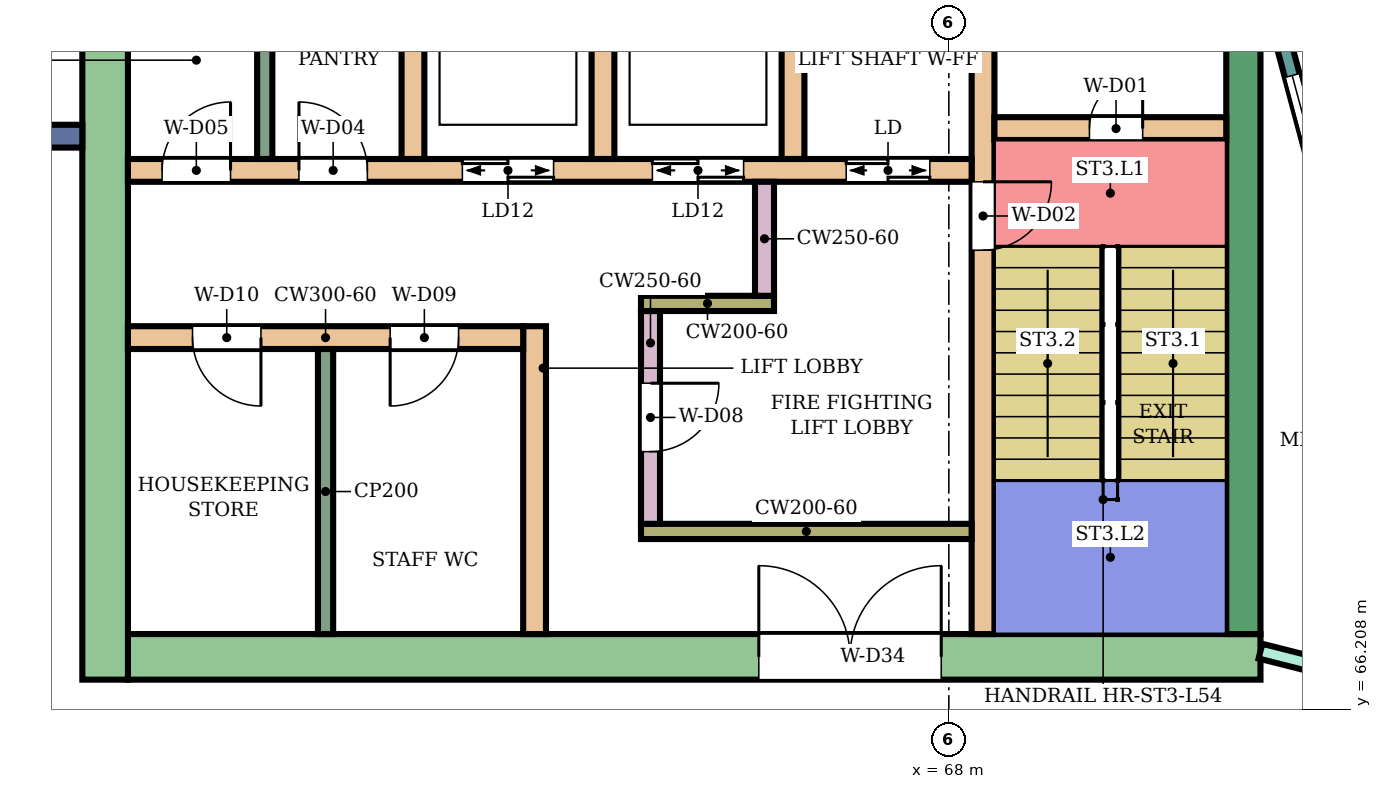
"""IFC4 building model, lengths in metres.
Left out: names, types, materials, properties, quantities, classifications, styles, units other than length and angle.
Written with IfcOpenShell. Run it as: python <this file> out.ifc"""

import sys

from ifc_helpers import new_model, si_unit, direction, frame, frame_2d, origin, place, context, subcontext, project, spatial, rectangle, extrude, element, fill, save


model = new_model("IFC4")
c1 = context("Model", 3, precision=1e-05, world=origin(), true_north=direction((0.0, 1.0)))
c2 = subcontext(c1, "Body", "Model", "MODEL_VIEW")
j1 = project(units=[si_unit("LENGTHUNIT", "METRE"), si_unit("PLANEANGLEUNIT", "RADIAN")], contexts=[c1])
p1 = place(None, origin())
s1 = spatial("IfcSite", under=j1, at=p1, CompositionType="ELEMENT")
p2 = place(p1, origin())
s2 = spatial("IfcBuilding", under=s1, at=p2, CompositionType="ELEMENT")
p3 = place(p2, frame((0.0, 0.0, 237.3)))
s3 = spatial("IfcBuildingStorey", under=s2, at=p3, CompositionType="ELEMENT", Elevation=237.3)
p4 = place(p3, frame((72.1, 66.9, 0.0), z_axis=(0.0, 0.0, 1.0), x_axis=(-1.0, 0.0, 0.0)))
e1 = element("IfcWall", 1, at=p4, inside=s3, PredefinedType="SHEAR", context=c2, shape_type="SweptSolid", body=[
    extrude(rectangle(XDim=14.9, YDim=0.6, at=frame_2d((7.45, 0.0))), origin(), (0.0, 0.0, 1.0), 3.88),
])
p5 = place(p4, frame((4.2, 0.0, 0.0)))
e2 = element("IfcOpeningElement", 2, at=p5, cuts=e1, PredefinedType="OPENING", context=c2, shape_type="SweptSolid", body=[
    extrude(rectangle(XDim=2.4, YDim=2.4, at=frame_2d((1.2, 1.2))), frame((0.0, 0.31, 0.0), z_axis=(0.0, -1.0, 0.0), x_axis=(1.0, 0.0, 0.0)), (0.0, 0.0, 1.0), 0.62),
])
p6 = place(p3, frame((71.875, 75.0, 0.0), z_axis=(0.0, 0.0, 1.0), x_axis=(0.0, -1.0, 0.0)))
e3 = element("IfcWall", 3, at=p6, inside=s3, PredefinedType="SHEAR", context=c2, shape_type="SweptSolid", body=[
    extrude(rectangle(XDim=7.8, YDim=0.45, at=frame_2d((3.9, 0.0))), origin(), (0.0, 0.0, 1.0), 3.88),
])
p7 = place(p3, frame((56.9, 83.4, 0.0), z_axis=(0.0, 0.0, 1.0), x_axis=(0.0, -1.0, 0.0)))
e4 = element("IfcWall", 4, at=p7, inside=s3, PredefinedType="SHEAR", context=c2, shape_type="SweptSolid", body=[
    extrude(rectangle(XDim=16.8, YDim=0.6, at=frame_2d((8.4, 0.0))), origin(), (0.0, 0.0, 1.0), 3.88),
])
p8 = place(p3, frame((68.45, 75.0, 0.0), z_axis=(0.0, 0.0, 1.0), x_axis=(0.0, -1.0, 0.0)))
e5 = element("IfcWall", 5, at=p8, inside=s3, PredefinedType="SHEAR", context=c2, shape_type="SweptSolid", body=[
    extrude(rectangle(XDim=7.8, YDim=0.3, at=frame_2d((3.9, 0.0))), origin(), (0.0, 0.0, 1.0), 3.88),
])
p9 = place(p8, frame((1.85, 0.0, 0.0)))
e6 = element("IfcOpeningElement", 6, at=p9, cuts=e5, PredefinedType="OPENING", context=c2, shape_type="SweptSolid", body=[
    extrude(rectangle(XDim=0.9, YDim=2.1, at=frame_2d((0.45, 1.05))), frame((0.0, 0.16, 0.0), z_axis=(0.0, -1.0, 0.0), x_axis=(1.0, 0.0, 0.0)), (0.0, 0.0, 1.0), 0.32),
])
p10 = place(p3, frame((71.65, 73.85, 0.0), z_axis=(0.0, 0.0, 1.0), x_axis=(-1.0, 0.0, 0.0)))
e7 = element("IfcWall", 7, at=p10, inside=s3, PredefinedType="SHEAR", context=c2, shape_type="SweptSolid", body=[
    extrude(rectangle(XDim=3.05, YDim=0.3, at=frame_2d((1.525, 0.0))), origin(), (0.0, 0.0, 1.0), 3.88),
])
p11 = place(p10, frame((1.1, 0.0, 0.0)))
e8 = element("IfcOpeningElement", 8, at=p11, cuts=e7, PredefinedType="OPENING", context=c2, shape_type="SweptSolid", body=[
    extrude(rectangle(XDim=0.7, YDim=2.0, at=frame_2d((0.35, 1.0))), frame((0.0, 0.16, 0.0), z_axis=(0.0, -1.0, 0.0), x_axis=(1.0, 0.0, 0.0)), (0.0, 0.0, 1.0), 0.32),
])
p12 = place(p3, frame((68.3, 73.3, 0.0), z_axis=(0.0, 0.0, 1.0), x_axis=(-1.0, 0.0, 0.0)))
e9 = element("IfcWall", 9, at=p12, inside=s3, PredefinedType="SHEAR", context=c2, shape_type="SweptSolid", body=[
    extrude(rectangle(XDim=11.1, YDim=0.3, at=frame_2d((5.55, 0.0))), origin(), (0.0, 0.0, 1.0), 3.88),
])
p13 = place(p12, frame((0.55, 0.0, 0.0)))
e10 = element("IfcOpeningElement", 10, at=p13, cuts=e9, PredefinedType="OPENING", context=c2, shape_type="SweptSolid", body=[
    extrude(rectangle(XDim=1.1, YDim=2.1, at=frame_2d((0.55, 1.05))), frame((0.0, 0.16, 0.0), z_axis=(0.0, -1.0, 0.0), x_axis=(1.0, 0.0, 0.0)), (0.0, 0.0, 1.0), 0.32),
])
p14 = place(p12, frame((3.0, 0.0, 0.0)))
e11 = element("IfcOpeningElement", 11, at=p14, cuts=e9, PredefinedType="OPENING", context=c2, shape_type="SweptSolid", body=[
    extrude(rectangle(XDim=1.2, YDim=2.1, at=frame_2d((0.6, 1.05))), frame((0.0, 0.16, 0.0), z_axis=(0.0, -1.0, 0.0), x_axis=(1.0, 0.0, 0.0)), (0.0, 0.0, 1.0), 0.32),
])
p15 = place(p12, frame((5.5, 0.0, 0.0)))
e12 = element("IfcOpeningElement", 12, at=p15, cuts=e9, PredefinedType="OPENING", context=c2, shape_type="SweptSolid", body=[
    extrude(rectangle(XDim=1.2, YDim=2.1, at=frame_2d((0.6, 1.05))), frame((0.0, 0.16, 0.0), z_axis=(0.0, -1.0, 0.0), x_axis=(1.0, 0.0, 0.0)), (0.0, 0.0, 1.0), 0.32),
])
p16 = place(p12, frame((7.95, 0.0, 0.0)))
e13 = element("IfcOpeningElement", 13, at=p16, cuts=e9, PredefinedType="OPENING", context=c2, shape_type="SweptSolid", body=[
    extrude(rectangle(XDim=0.9, YDim=2.1, at=frame_2d((0.45, 1.05))), frame((0.0, 0.16, 0.0), z_axis=(0.0, -1.0, 0.0), x_axis=(1.0, 0.0, 0.0)), (0.0, 0.0, 1.0), 0.32),
])
p17 = place(p12, frame((9.75, 0.0, 0.0)))
e14 = element("IfcOpeningElement", 14, at=p17, cuts=e9, PredefinedType="OPENING", context=c2, shape_type="SweptSolid", body=[
    extrude(rectangle(XDim=0.9, YDim=2.1, at=frame_2d((0.45, 1.05))), frame((0.0, 0.16, 0.0), z_axis=(0.0, -1.0, 0.0), x_axis=(1.0, 0.0, 0.0)), (0.0, 0.0, 1.0), 0.32),
])
for number, where, z_axis, x_axis in (
    (15, (65.95, 76.0, 0.0), (0.0, 0.0, 1.0), (0.0, -1.0, 0.0)),
    (16, (63.45, 76.0, 0.0), (0.0, 0.0, 1.0), (0.0, -1.0, 0.0)),
    (17, (60.95, 76.0, 0.0), (0.0, 0.0, 1.0), (0.0, -1.0, 0.0)),
):
    element("IfcWall", number, at=place(p3, frame(where, z_axis=z_axis, x_axis=x_axis)), inside=s3, PredefinedType="SHEAR", context=c2, shape_type="SweptSolid", body=[
        extrude(rectangle(XDim=2.55, YDim=0.3, at=frame_2d((1.275, 0.0))), origin(), (0.0, 0.0, 1.0), 3.88),
    ])
p18 = place(p3, frame((68.3, 68.55, 0.0), z_axis=(0.0, 0.0, 1.0), x_axis=(-1.0, 0.0, 0.0)))
e18 = element("IfcWall", 18, at=p18, inside=s3, PredefinedType="SHEAR", context=c2, shape_type="SweptSolid", body=[
    extrude(rectangle(XDim=4.35, YDim=0.2, at=frame_2d((2.175, 0.0))), origin(), (0.0, 0.0, 1.0), 3.88),
])
p19 = place(p3, frame((64.075, 71.45, 0.0), z_axis=(0.0, 0.0, 1.0), x_axis=(0.0, -1.0, 0.0)))
e19 = element("IfcWall", 19, at=p19, inside=s3, PredefinedType="SHEAR", context=c2, shape_type="SweptSolid", body=[
    extrude(rectangle(XDim=2.8, YDim=0.25, at=frame_2d((1.4, 0.0))), origin(), (0.0, 0.0, 1.0), 3.88),
])
p20 = place(p19, frame((0.95, 0.0, 0.0)))
e20 = element("IfcOpeningElement", 20, at=p20, cuts=e19, PredefinedType="OPENING", context=c2, shape_type="SweptSolid", body=[
    extrude(rectangle(XDim=0.9, YDim=2.1, at=frame_2d((0.45, 1.05))), frame((0.0, 0.135, 0.0), z_axis=(0.0, -1.0, 0.0), x_axis=(1.0, 0.0, 0.0)), (0.0, 0.0, 1.0), 0.27),
])
p21 = place(p3, frame((65.7, 71.55, 0.0), z_axis=(0.0, 0.0, 1.0), x_axis=(-1.0, 0.0, 0.0)))
e21 = element("IfcWall", 21, at=p21, inside=s3, PredefinedType="SHEAR", context=c2, shape_type="SweptSolid", body=[
    extrude(rectangle(XDim=1.75, YDim=0.2, at=frame_2d((0.875, 0.0))), origin(), (0.0, 0.0, 1.0), 3.88),
])
p22 = place(p3, frame((65.575, 73.15, 0.0), z_axis=(0.0, 0.0, 1.0), x_axis=(0.0, -1.0, 0.0)))
e22 = element("IfcWall", 22, at=p22, inside=s3, PredefinedType="SHEAR", context=c2, shape_type="SweptSolid", body=[
    extrude(rectangle(XDim=1.5, YDim=0.25, at=frame_2d((0.75, 0.0))), origin(), (0.0, 0.0, 1.0), 3.88),
])
p23 = place(p3, frame((62.55, 71.25, 0.0), z_axis=(0.0, 0.0, 1.0), x_axis=(0.0, -1.0, 0.0)))
e23 = element("IfcWall", 23, at=p23, inside=s3, PredefinedType="SHEAR", context=c2, shape_type="SweptSolid", body=[
    extrude(rectangle(XDim=4.05, YDim=0.3, at=frame_2d((2.025, 0.0))), origin(), (0.0, 0.0, 1.0), 3.88),
])
p24 = place(p3, frame((62.4, 71.1, 0.0), z_axis=(0.0, 0.0, 1.0), x_axis=(-1.0, 0.0, 0.0)))
e24 = element("IfcWall", 24, at=p24, inside=s3, PredefinedType="SHEAR", context=c2, shape_type="SweptSolid", body=[
    extrude(rectangle(XDim=5.2, YDim=0.3, at=frame_2d((2.6, 0.0))), origin(), (0.0, 0.0, 1.0), 3.88),
])
p25 = place(p24, frame((0.85, 0.0, 0.0)))
e25 = element("IfcOpeningElement", 25, at=p25, cuts=e24, PredefinedType="OPENING", context=c2, shape_type="SweptSolid", body=[
    extrude(rectangle(XDim=0.9, YDim=2.1, at=frame_2d((0.45, 1.05))), frame((0.0, 0.16, 0.0), z_axis=(0.0, -1.0, 0.0), x_axis=(1.0, 0.0, 0.0)), (0.0, 0.0, 1.0), 0.32),
])
p26 = place(p24, frame((3.45, 0.0, 0.0)))
e26 = element("IfcOpeningElement", 26, at=p26, cuts=e24, PredefinedType="OPENING", context=c2, shape_type="SweptSolid", body=[
    extrude(rectangle(XDim=0.9, YDim=2.1, at=frame_2d((0.45, 1.05))), frame((0.0, 0.16, 0.0), z_axis=(0.0, -1.0, 0.0), x_axis=(1.0, 0.0, 0.0)), (0.0, 0.0, 1.0), 0.32),
])
p27 = place(p3, frame((56.6, 73.75, 0.0), z_axis=(0.0, 0.0, 1.0), x_axis=(-1.0, 0.0, 0.0)))
e27 = element("IfcWall", 27, at=p27, inside=s3, PredefinedType="NOTDEFINED", context=c2, shape_type="SweptSolid", body=[
    extrude(rectangle(XDim=2.416, YDim=0.3, at=frame_2d((1.208, 0.0))), origin(), (0.0, 0.0, 1.0), 4.2),
])
p28 = place(p3, frame((72.396, 75.0, 0.0), z_axis=(0.0, 0.0, 1.0), x_axis=(0.258789828301, -0.965933654434, 0.0)))
e28 = element("IfcWall", 28, at=p28, inside=s3, PredefinedType="NOTDEFINED", context=c2, shape_type="SweptSolid", body=[
    extrude(rectangle(XDim=3.936, YDim=0.2, at=frame_2d((1.968, 0.0))), origin(), (0.0, 0.0, 1.0), 4.2),
])
p29 = place(p28, frame((0.468, 0.0, 0.9)))
e29 = element("IfcOpeningElement", 29, at=p29, cuts=e28, PredefinedType="OPENING", context=c2, shape_type="SweptSolid", body=[
    extrude(rectangle(XDim=3.0, YDim=2.3, at=frame_2d((1.5, 1.15))), frame((0.0, 0.11, 0.0), z_axis=(0.0, -1.0, 0.0), x_axis=(1.0, 0.0, 0.0)), (0.0, 0.0, 1.0), 0.22),
])
p30 = place(p3, frame((72.1, 66.975, 0.0), z_axis=(0.0, 0.0, 1.0), x_axis=(0.969471314457, -0.245204752086, 0.0)))
e30 = element("IfcWall", 30, at=p30, inside=s3, PredefinedType="PARTITIONING", context=c2, shape_type="SweptSolid", body=[
    extrude(rectangle(XDim=2.582, YDim=0.2, at=frame_2d((1.291, 0.0))), origin(), (0.0, 0.0, 1.0), 3.75),
])
p31 = place(p30, frame((0.841, 0.0, 0.0)))
e31 = element("IfcOpeningElement", 31, at=p31, cuts=e30, PredefinedType="OPENING", context=c2, shape_type="SweptSolid", body=[
    extrude(rectangle(XDim=0.9, YDim=2.1, at=frame_2d((0.45, 1.05))), frame((0.0, 0.11, 0.0), z_axis=(0.0, -1.0, 0.0), x_axis=(1.0, 0.0, 0.0)), (0.0, 0.0, 1.0), 0.22),
])
p32 = place(p3, frame((59.0, 76.0, 0.0), z_axis=(0.0, 0.0, 1.0), x_axis=(0.0, -1.0, 0.0)))
e32 = element("IfcWall", 32, at=p32, inside=s3, PredefinedType="PARTITIONING", context=c2, shape_type="SweptSolid", body=[
    extrude(rectangle(XDim=2.55, YDim=0.2, at=frame_2d((1.275, 0.0))), origin(), (0.0, 0.0, 1.0), 3.88),
])
p33 = place(p3, frame((59.8, 70.95, 0.0), z_axis=(0.0, 0.0, 1.0), x_axis=(0.0, -1.0, 0.0)))
e33 = element("IfcWall", 33, at=p33, inside=s3, PredefinedType="PARTITIONING", context=c2, shape_type="SweptSolid", body=[
    extrude(rectangle(XDim=3.75, YDim=0.2, at=frame_2d((1.875, 0.0))), origin(), (0.0, 0.0, 1.0), 3.88),
])
p34 = place(p29, origin())
e34 = element("IfcWindow", 34, at=p34, inside=s3, PartitioningType="SINGLE_PANEL", PredefinedType="WINDOW", context=c2, shape_type="SweptSolid", body=[
    extrude(rectangle(XDim=3.0, YDim=2.3, at=frame_2d((1.5, 1.15))), frame((0.0, 0.03, 0.0), z_axis=(0.0, -1.0, 0.0), x_axis=(1.0, 0.0, 0.0)), (0.0, 0.0, 1.0), 0.06),
])
fill(e29, e34)
p35 = place(p11, frame((0.7, 0.0, 0.0), z_axis=(0.0, 0.0, 1.0), x_axis=(-1.0, 0.0, 0.0)))
e35 = element("IfcDoor", 35, at=p35, inside=s3, OperationType="SINGLE_SWING_RIGHT", PredefinedType="DOOR", context=c2, shape_type="SweptSolid", body=[
    extrude(rectangle(XDim=0.7, YDim=2.0, at=frame_2d((0.35, 1.0))), frame((0.0, 0.025, 0.0), z_axis=(0.0, -1.0, 0.0), x_axis=(1.0, 0.0, 0.0)), (0.0, 0.0, 1.0), 0.05),
])
fill(e8, e35)
p36 = place(p9, origin())
e36 = element("IfcDoor", 36, at=p36, inside=s3, OperationType="SINGLE_SWING_LEFT", PredefinedType="DOOR", context=c2, shape_type="SweptSolid", body=[
    extrude(rectangle(XDim=0.9, YDim=2.1, at=frame_2d((0.45, 1.05))), frame((0.0, 0.025, 0.0), z_axis=(0.0, -1.0, 0.0), x_axis=(1.0, 0.0, 0.0)), (0.0, 0.0, 1.0), 0.05),
])
fill(e6, e36)
p37 = place(p13, origin())
e37 = element("IfcDoor", 37, at=p37, inside=s3, OperationType="DOUBLE_DOOR_SLIDING", PredefinedType="DOOR", context=c2, shape_type="SweptSolid", body=[
    extrude(rectangle(XDim=1.1, YDim=2.1, at=frame_2d((0.55, 1.05))), frame((0.0, 0.025, 0.0), z_axis=(0.0, -1.0, 0.0), x_axis=(1.0, 0.0, 0.0)), (0.0, 0.0, 1.0), 0.05),
])
fill(e10, e37)
p38 = place(p14, origin())
e38 = element("IfcDoor", 38, at=p38, inside=s3, OperationType="DOUBLE_DOOR_SLIDING", PredefinedType="DOOR", context=c2, shape_type="SweptSolid", body=[
    extrude(rectangle(XDim=1.2, YDim=2.1, at=frame_2d((0.6, 1.05))), frame((0.0, 0.025, 0.0), z_axis=(0.0, -1.0, 0.0), x_axis=(1.0, 0.0, 0.0)), (0.0, 0.0, 1.0), 0.05),
])
fill(e11, e38)
p39 = place(p15, origin())
e39 = element("IfcDoor", 39, at=p39, inside=s3, OperationType="DOUBLE_DOOR_SLIDING", PredefinedType="DOOR", context=c2, shape_type="SweptSolid", body=[
    extrude(rectangle(XDim=1.2, YDim=2.1, at=frame_2d((0.6, 1.05))), frame((0.0, 0.025, 0.0), z_axis=(0.0, -1.0, 0.0), x_axis=(1.0, 0.0, 0.0)), (0.0, 0.0, 1.0), 0.05),
])
fill(e12, e39)
p40 = place(p16, frame((0.9, 0.0, 0.0), z_axis=(0.0, 0.0, 1.0), x_axis=(-1.0, 0.0, 0.0)))
e40 = element("IfcDoor", 40, at=p40, inside=s3, OperationType="SINGLE_SWING_LEFT", PredefinedType="DOOR", context=c2, shape_type="SweptSolid", body=[
    extrude(rectangle(XDim=0.9, YDim=2.1, at=frame_2d((0.45, 1.05))), frame((0.0, 0.025, 0.0), z_axis=(0.0, -1.0, 0.0), x_axis=(1.0, 0.0, 0.0)), (0.0, 0.0, 1.0), 0.05),
])
fill(e13, e40)
p41 = place(p17, frame((0.9, 0.0, 0.0), z_axis=(0.0, 0.0, 1.0), x_axis=(-1.0, 0.0, 0.0)))
e41 = element("IfcDoor", 41, at=p41, inside=s3, OperationType="SINGLE_SWING_RIGHT", PredefinedType="DOOR", context=c2, shape_type="SweptSolid", body=[
    extrude(rectangle(XDim=0.9, YDim=2.1, at=frame_2d((0.45, 1.05))), frame((0.0, 0.025, 0.0), z_axis=(0.0, -1.0, 0.0), x_axis=(1.0, 0.0, 0.0)), (0.0, 0.0, 1.0), 0.05),
])
fill(e14, e41)
p42 = place(p20, origin())
e42 = element("IfcDoor", 42, at=p42, inside=s3, OperationType="SINGLE_SWING_LEFT", PredefinedType="DOOR", context=c2, shape_type="SweptSolid", body=[
    extrude(rectangle(XDim=0.9, YDim=2.1, at=frame_2d((0.45, 1.05))), frame((0.0, 0.025, 0.0), z_axis=(0.0, -1.0, 0.0), x_axis=(1.0, 0.0, 0.0)), (0.0, 0.0, 1.0), 0.05),
])
fill(e20, e42)
p43 = place(p25, origin())
e43 = element("IfcDoor", 43, at=p43, inside=s3, OperationType="SINGLE_SWING_RIGHT", PredefinedType="DOOR", context=c2, shape_type="SweptSolid", body=[
    extrude(rectangle(XDim=0.9, YDim=2.1, at=frame_2d((0.45, 1.05))), frame((0.0, 0.025, 0.0), z_axis=(0.0, -1.0, 0.0), x_axis=(1.0, 0.0, 0.0)), (0.0, 0.0, 1.0), 0.05),
])
fill(e25, e43)
p44 = place(p26, origin())
e44 = element("IfcDoor", 44, at=p44, inside=s3, OperationType="SINGLE_SWING_LEFT", PredefinedType="DOOR", context=c2, shape_type="SweptSolid", body=[
    extrude(rectangle(XDim=0.9, YDim=2.1, at=frame_2d((0.45, 1.05))), frame((0.0, 0.025, 0.0), z_axis=(0.0, -1.0, 0.0), x_axis=(1.0, 0.0, 0.0)), (0.0, 0.0, 1.0), 0.05),
])
fill(e26, e44)
p45 = place(p5, frame((2.4, 0.0, 0.0), z_axis=(0.0, 0.0, 1.0), x_axis=(-1.0, 0.0, 0.0)))
e45 = element("IfcDoor", 45, at=p45, inside=s3, OperationType="DOUBLE_DOOR_SINGLE_SWING", PredefinedType="DOOR", context=c2, shape_type="SweptSolid", body=[
    extrude(rectangle(XDim=2.4, YDim=2.4, at=frame_2d((1.2, 1.2))), frame((0.0, 0.025, 0.0), z_axis=(0.0, -1.0, 0.0), x_axis=(1.0, 0.0, 0.0)), (0.0, 0.0, 1.0), 0.05),
])
fill(e2, e45)
save(model, sys.argv[1])
